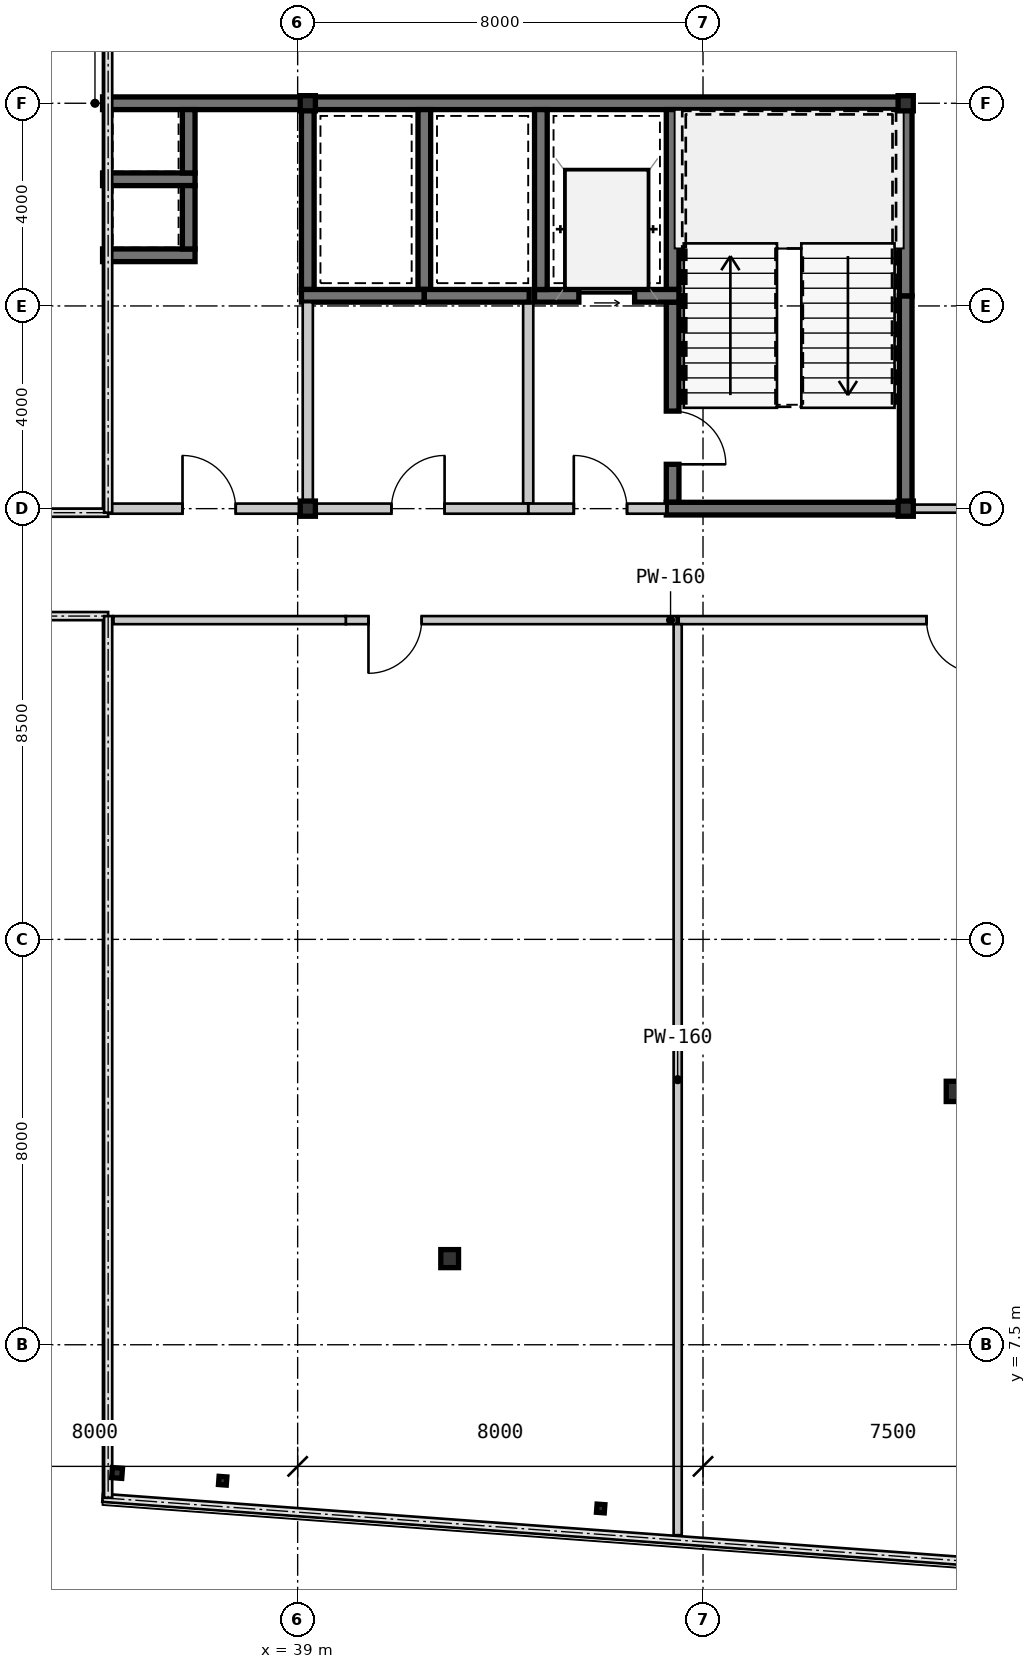
"""IFC4 building model, lengths in metres.
Left out: names, types, materials, properties, quantities, classifications, styles, units other than length and angle.
Written with IfcOpenShell. Run it as: python <this file> out.ifc"""

import sys

from ifc_helpers import new_model, si_unit, direction, frame, frame_2d, origin, origin_2d, place, context, subcontext, project, spatial, rectangle, hollow_rectangle, i_section, extrude, source, transform, mapped, element, fill, save


model = new_model("IFC4")
c1 = context("Model", 3, precision=1e-05, world=origin(), true_north=direction((0.0, 1.0)))
c2 = subcontext(c1, "Body", "Model", "MODEL_VIEW")
j1 = project(units=[si_unit("LENGTHUNIT", "METRE"), si_unit("PLANEANGLEUNIT", "RADIAN")], contexts=[c1])
p1 = place(None, origin())
s1 = spatial("IfcSite", under=j1, at=p1, CompositionType="ELEMENT")
p2 = place(p1, origin())
s2 = spatial("IfcBuilding", under=s1, at=p2, CompositionType="ELEMENT")
p3 = place(p2, frame((0.0, 0.0, 230.3)))
s3 = spatial("IfcBuildingStorey", under=s2, at=p3, CompositionType="ELEMENT", Elevation=230.3)
m1 = source(origin(), c2, "Body", "SweptSolid", [
    extrude(hollow_rectangle(XDim=0.3, YDim=0.3, WallThickness=0.012, at=origin_2d()), origin(), (0.0, 0.0, 1.0), 3.15),
])
for number, where, z_axis, x_axis in (
    (1, (39.2, 24.0, 0.0), (0.0, 0.0, 1.0), (1.0, 0.0, 0.0)),
    (2, (51.0, 24.0, 0.0), (0.0, 0.0, 1.0), (1.0, 0.0, 0.0)),
    (3, (39.2, 32.0, 0.0), (0.0, 0.0, 1.0), (1.0, 0.0, 0.0)),
    (4, (51.0, 32.0, 0.0), (0.0, 0.0, 1.0), (1.0, 0.0, 0.0)),
):
    element("IfcColumn", number, at=place(p3, frame(where, z_axis=z_axis, x_axis=x_axis)), inside=s3, PredefinedType="COLUMN", context=c2, shape_type="MappedRepresentation", body=[
        mapped(m1, transform((0.0, 0.0, 0.0), scale=1.0)),
    ])
m2 = source(origin(), c2, "Body", "SweptSolid", [
    extrude(i_section(OverallWidth=0.35, OverallDepth=0.356, WebThickness=0.018, FlangeThickness=0.028, at=origin_2d()), origin(), (0.0, 0.0, 1.0), 3.15),
])
p4 = place(p3, frame((42.0, 9.2, 0.0), z_axis=(0.0, 0.0, 1.0), x_axis=(1.0, 0.0, 0.0)))
e5 = element("IfcColumn", 5, at=p4, inside=s3, PredefinedType="COLUMN", context=c2, shape_type="MappedRepresentation", body=[
    mapped(m2, transform((0.0, 0.0, 0.0), scale=1.0)),
])
m3 = source(origin(), c2, "Body", "SweptSolid", [
    extrude(hollow_rectangle(XDim=0.4, YDim=0.4, WallThickness=0.016, at=origin_2d()), origin(), (0.0, 0.0, 1.0), 3.15),
])
p5 = place(p3, frame((52.0, 12.5, 0.0), z_axis=(0.0, 0.0, 1.0), x_axis=(1.0, 0.0, 0.0)))
e6 = element("IfcColumn", 6, at=p5, inside=s3, PredefinedType="COLUMN", context=c2, shape_type="MappedRepresentation", body=[
    mapped(m3, transform((0.0, 0.0, 0.0), scale=1.0)),
])
m4 = source(origin(), c2, "Body", "SweptSolid", [
    extrude(i_section(OverallWidth=0.154, OverallDepth=0.162, WebThickness=0.008, FlangeThickness=0.011, at=origin_2d()), origin(), (0.0, 0.0, 1.0), 3.15),
])
for number, where, z_axis, x_axis in (
    (7, (37.521, 4.817, 0.0), (0.0, 0.0, 1.0), (0.997, -0.073, 0.0)),
    (8, (44.98, 4.269, 0.0), (0.0, 0.0, 1.0), (0.997, -0.073, 0.0)),
):
    element("IfcColumn", number, at=place(p3, frame(where, z_axis=z_axis, x_axis=x_axis)), inside=s3, PredefinedType="COLUMN", context=c2, shape_type="MappedRepresentation", body=[
        mapped(m4, transform((0.0, 0.0, 0.0), scale=1.0)),
    ])
m5 = source(origin(), c2, "Body", "SweptSolid", [
    extrude(hollow_rectangle(XDim=0.2, YDim=0.2, WallThickness=0.009, at=origin_2d()), origin(), (0.0, 0.0, 1.0), 3.15),
])
p6 = place(p3, frame((35.436, 4.97, 0.0), z_axis=(0.0, 0.0, 1.0), x_axis=(0.997314477224, -0.073238197128, 0.0)))
e9 = element("IfcColumn", 9, at=p6, inside=s3, PredefinedType="COLUMN", context=c2, shape_type="MappedRepresentation", body=[
    mapped(m5, transform((0.0, 0.0, 0.0), scale=1.0)),
])
m6 = source(origin(), c2, "Body", "SweptSolid", [
    extrude(rectangle(XDim=4.05, YDim=0.25, at=frame_2d((2.025, 0.0))), origin(), (0.0, 0.0, 1.0), 2.93),
])
p7 = place(p3, frame((35.15, 32.0, 0.0), z_axis=(0.0, 0.0, 1.0), x_axis=(1.0, 0.0, 0.0)))
e10 = element("IfcWall", 10, at=p7, inside=s3, PredefinedType="SHEAR", context=c2, shape_type="MappedRepresentation", body=[
    mapped(m6, transform((0.0, 0.0, 0.0), scale=1.0)),
])
m7 = source(origin(), c2, "Body", "SweptSolid", [
    extrude(rectangle(XDim=11.925, YDim=0.25, at=frame_2d((5.962, 0.0))), origin(), (0.0, 0.0, 1.0), 2.93),
])
p8 = place(p3, frame((39.2, 32.0, 0.0), z_axis=(0.0, 0.0, 1.0), x_axis=(1.0, 0.0, 0.0)))
e11 = element("IfcWall", 11, at=p8, inside=s3, PredefinedType="SHEAR", context=c2, shape_type="MappedRepresentation", body=[
    mapped(m7, transform((0.0, 0.0, 0.0), scale=1.0)),
])
m8 = source(origin(), c2, "Body", "SweptSolid", [
    extrude(rectangle(XDim=4.075, YDim=0.25, at=frame_2d((2.038, 0.0))), origin(), (0.0, 0.0, 1.0), 2.93),
])
p9 = place(p3, frame((51.0, 24.125, 0.0), z_axis=(0.0, 0.0, 1.0), x_axis=(0.0, 1.0, 0.0)))
e12 = element("IfcWall", 12, at=p9, inside=s3, PredefinedType="SHEAR", context=c2, shape_type="MappedRepresentation", body=[
    mapped(m8, transform((0.0, 0.0, 0.0), scale=1.0)),
])
m9 = source(origin(), c2, "Body", "SweptSolid", [
    extrude(rectangle(XDim=3.675, YDim=0.25, at=frame_2d((1.837, 0.0))), origin(), (0.0, 0.0, 1.0), 2.93),
])
p10 = place(p3, frame((51.0, 28.2, 0.0), z_axis=(0.0, 0.0, 1.0), x_axis=(0.0, 1.0, 0.0)))
e13 = element("IfcWall", 13, at=p10, inside=s3, PredefinedType="SHEAR", context=c2, shape_type="MappedRepresentation", body=[
    mapped(m9, transform((0.0, 0.0, 0.0), scale=1.0)),
])
m10 = source(origin(), c2, "Body", "SweptSolid", [
    extrude(rectangle(XDim=3.55, YDim=0.25, at=frame_2d((1.775, 0.0))), origin(), (0.0, 0.0, 1.0), 2.93),
])
p11 = place(p3, frame((46.4, 31.875, 0.0), z_axis=(0.0, 0.0, 1.0), x_axis=(0.0, -1.0, 0.0)))
e14 = element("IfcWall", 14, at=p11, inside=s3, PredefinedType="SHEAR", context=c2, shape_type="MappedRepresentation", body=[
    mapped(m10, transform((0.0, 0.0, 0.0), scale=1.0)),
])
m11 = source(origin(), c2, "Body", "SweptSolid", [
    extrude(rectangle(XDim=3.95, YDim=0.25, at=frame_2d((1.975, 0.0))), origin(), (0.0, 0.0, 1.0), 2.93),
])
p12 = place(p3, frame((46.4, 28.075, 0.0), z_axis=(0.0, 0.0, 1.0), x_axis=(0.0, -1.0, 0.0)))
e15 = element("IfcWall", 15, at=p12, inside=s3, PredefinedType="SHEAR", context=c2, shape_type="MappedRepresentation", body=[
    mapped(m11, transform((0.0, 0.0, 0.0), scale=1.0)),
])
m12 = source(origin(), c2, "Body", "SweptSolid", [
    extrude(rectangle(XDim=1.05, YDim=2.1, at=frame_2d((0.525, 1.05))), frame((0.0, 0.135, 0.0), z_axis=(0.0, -1.0, 0.0), x_axis=(1.0, 0.0, 0.0)), (0.0, 0.0, 1.0), 0.27),
])
p13 = place(p12, frame((2.15, 0.0, 0.0)))
e16 = element("IfcOpeningElement", 16, at=p13, cuts=e15, PredefinedType="OPENING", context=c2, shape_type="MappedRepresentation", body=[
    mapped(m12, transform((0.0, 0.0, 0.0), scale=1.0)),
])
m13 = source(origin(), c2, "Body", "SweptSolid", [
    extrude(rectangle(XDim=4.85, YDim=0.25, at=frame_2d((2.425, 0.0))), origin(), (0.0, 0.0, 1.0), 2.93),
])
p14 = place(p3, frame((46.275, 24.0, 0.0), z_axis=(0.0, 0.0, 1.0), x_axis=(1.0, 0.0, 0.0)))
e17 = element("IfcWall", 17, at=p14, inside=s3, PredefinedType="SHEAR", context=c2, shape_type="MappedRepresentation", body=[
    mapped(m13, transform((0.0, 0.0, 0.0), scale=1.0)),
])
m14 = source(origin(), c2, "Body", "SweptSolid", [
    extrude(rectangle(XDim=2.85, YDim=0.25, at=frame_2d((1.425, 0.0))), origin(), (0.0, 0.0, 1.0), 2.93),
])
p15 = place(p3, frame((43.675, 28.2, 0.0), z_axis=(0.0, 0.0, 1.0), x_axis=(1.0, 0.0, 0.0)))
e18 = element("IfcWall", 18, at=p15, inside=s3, PredefinedType="SHEAR", context=c2, shape_type="MappedRepresentation", body=[
    mapped(m14, transform((0.0, 0.0, 0.0), scale=1.0)),
])
m15 = source(origin(), c2, "Body", "SweptSolid", [
    extrude(rectangle(XDim=1.1, YDim=2.15, at=frame_2d((0.55, 1.075))), frame((0.0, 0.135, 0.0), z_axis=(0.0, -1.0, 0.0), x_axis=(1.0, 0.0, 0.0)), (0.0, 0.0, 1.0), 0.27),
])
p16 = place(p15, frame((0.875, 0.0, 0.0)))
e19 = element("IfcOpeningElement", 19, at=p16, cuts=e18, PredefinedType="OPENING", context=c2, shape_type="MappedRepresentation", body=[
    mapped(m15, transform((0.0, 0.0, 0.0), scale=1.0)),
])
p17 = place(p3, frame((43.8, 31.875, 0.0), z_axis=(0.0, 0.0, 1.0), x_axis=(0.0, -1.0, 0.0)))
e20 = element("IfcWall", 20, at=p17, inside=s3, PredefinedType="SHEAR", context=c2, shape_type="MappedRepresentation", body=[
    mapped(m10, transform((0.0, 0.0, 0.0), scale=1.0)),
])
m16 = source(origin(), c2, "Body", "SweptSolid", [
    extrude(rectangle(XDim=3.975, YDim=0.2, at=frame_2d((1.987, 0.0))), origin(), (0.0, 0.0, 1.0), 2.93),
])
p18 = place(p3, frame((43.55, 28.075, 0.0), z_axis=(0.0, 0.0, 1.0), x_axis=(0.0, -1.0, 0.0)))
e21 = element("IfcWall", 21, at=p18, inside=s3, PredefinedType="SOLIDWALL", context=c2, shape_type="MappedRepresentation", body=[
    mapped(m16, transform((0.0, 0.0, 0.0), scale=1.0)),
])
m17 = source(origin(), c2, "Body", "SweptSolid", [
    extrude(rectangle(XDim=2.725, YDim=0.2, at=frame_2d((1.362, 0.0))), origin(), (0.0, 0.0, 1.0), 2.397),
])
p19 = place(p3, frame((43.55, 24.0, 0.0), z_axis=(0.0, 0.0, 1.0), x_axis=(1.0, 0.0, 0.0)))
e22 = element("IfcWall", 22, at=p19, inside=s3, PredefinedType="SOLIDWALL", context=c2, shape_type="MappedRepresentation", body=[
    mapped(m17, transform((0.0, 0.0, 0.0), scale=1.0)),
])
m18 = source(origin(), c2, "Body", "SweptSolid", [
    extrude(rectangle(XDim=1.05, YDim=2.1, at=frame_2d((0.525, 1.05))), frame((0.0, 0.11, 0.0), z_axis=(0.0, -1.0, 0.0), x_axis=(1.0, 0.0, 0.0)), (0.0, 0.0, 1.0), 0.22),
])
p20 = place(p19, frame((0.9, 0.0, 0.0)))
e23 = element("IfcOpeningElement", 23, at=p20, cuts=e22, PredefinedType="OPENING", context=c2, shape_type="MappedRepresentation", body=[
    mapped(m18, transform((0.0, 0.0, 0.0), scale=1.0)),
])
m19 = source(origin(), c2, "Body", "SweptSolid", [
    extrude(rectangle(XDim=1.825, YDim=0.25, at=frame_2d((0.913, 0.0))), origin(), (0.0, 0.0, 1.0), 2.93),
])
p21 = place(p3, frame((35.15, 30.5, 0.0), z_axis=(0.0, 0.0, 1.0), x_axis=(1.0, 0.0, 0.0)))
e24 = element("IfcWall", 24, at=p21, inside=s3, PredefinedType="SHEAR", context=c2, shape_type="MappedRepresentation", body=[
    mapped(m19, transform((0.0, 0.0, 0.0), scale=1.0)),
])
m20 = source(origin(), c2, "Body", "SweptSolid", [
    extrude(rectangle(XDim=1.25, YDim=0.25, at=frame_2d((0.625, 0.0))), origin(), (0.0, 0.0, 1.0), 2.93),
])
p22 = place(p3, frame((36.85, 30.625, 0.0), z_axis=(0.0, 0.0, 1.0), x_axis=(0.0, 1.0, 0.0)))
e25 = element("IfcWall", 25, at=p22, inside=s3, PredefinedType="SHEAR", context=c2, shape_type="MappedRepresentation", body=[
    mapped(m20, transform((0.0, 0.0, 0.0), scale=1.0)),
])
p23 = place(p3, frame((35.15, 29.0, 0.0), z_axis=(0.0, 0.0, 1.0), x_axis=(1.0, 0.0, 0.0)))
e26 = element("IfcWall", 26, at=p23, inside=s3, PredefinedType="SHEAR", context=c2, shape_type="MappedRepresentation", body=[
    mapped(m19, transform((0.0, 0.0, 0.0), scale=1.0)),
])
p24 = place(p3, frame((36.85, 29.125, 0.0), z_axis=(0.0, 0.0, 1.0), x_axis=(0.0, 1.0, 0.0)))
e27 = element("IfcWall", 27, at=p24, inside=s3, PredefinedType="SHEAR", context=c2, shape_type="MappedRepresentation", body=[
    mapped(m20, transform((0.0, 0.0, 0.0), scale=1.0)),
])
for number, where, z_axis, x_axis in (
    (28, (41.5, 28.325, 0.0), (0.0, 0.0, 1.0), (0.0, 1.0, 0.0)),
    (29, (39.2, 31.875, 0.0), (0.0, 0.0, 1.0), (0.0, -1.0, 0.0)),
):
    element("IfcWall", number, at=place(p3, frame(where, z_axis=z_axis, x_axis=x_axis)), inside=s3, PredefinedType="SHEAR", context=c2, shape_type="MappedRepresentation", body=[
        mapped(m10, transform((0.0, 0.0, 0.0), scale=1.0)),
    ])
m21 = source(origin(), c2, "Body", "SweptSolid", [
    extrude(rectangle(XDim=2.425, YDim=0.25, at=frame_2d((1.212, 0.0))), origin(), (0.0, 0.0, 1.0), 2.93),
])
p25 = place(p3, frame((39.075, 28.2, 0.0), z_axis=(0.0, 0.0, 1.0), x_axis=(1.0, 0.0, 0.0)))
e30 = element("IfcWall", 30, at=p25, inside=s3, PredefinedType="SHEAR", context=c2, shape_type="MappedRepresentation", body=[
    mapped(m21, transform((0.0, 0.0, 0.0), scale=1.0)),
])
m22 = source(origin(), c2, "Body", "SweptSolid", [
    extrude(rectangle(XDim=2.07, YDim=0.25, at=frame_2d((1.035, 0.0))), origin(), (0.0, 0.0, 1.0), 2.93),
])
p26 = place(p3, frame((41.5, 28.2, 0.0), z_axis=(0.0, 0.0, 1.0), x_axis=(1.0, 0.0, 0.0)))
e31 = element("IfcWall", 31, at=p26, inside=s3, PredefinedType="SHEAR", context=c2, shape_type="MappedRepresentation", body=[
    mapped(m22, transform((0.0, 0.0, 0.0), scale=1.0)),
])
m23 = source(origin(), c2, "Body", "SweptSolid", [
    extrude(rectangle(XDim=3.975, YDim=0.2, at=frame_2d((1.987, 0.0))), origin(), (0.0, 0.0, 1.0), 2.47),
])
p27 = place(p3, frame((39.2, 28.075, 0.0), z_axis=(0.0, 0.0, 1.0), x_axis=(0.0, -1.0, 0.0)))
e32 = element("IfcWall", 32, at=p27, inside=s3, PredefinedType="SOLIDWALL", context=c2, shape_type="MappedRepresentation", body=[
    mapped(m23, transform((0.0, 0.0, 0.0), scale=1.0)),
])
m24 = source(origin(), c2, "Body", "SweptSolid", [
    extrude(rectangle(XDim=3.895, YDim=0.2, at=frame_2d((1.947, 0.0))), origin(), (0.0, 0.0, 1.0), 2.23),
])
p28 = place(p3, frame((39.2, 24.0, 0.0), z_axis=(0.0, 0.0, 1.0), x_axis=(-1.0, 0.0, 0.0)))
e33 = element("IfcWall", 33, at=p28, inside=s3, PredefinedType="SOLIDWALL", context=c2, shape_type="MappedRepresentation", body=[
    mapped(m24, transform((0.0, 0.0, 0.0), scale=1.0)),
])
p29 = place(p28, frame((1.422, 0.0, 0.0)))
e34 = element("IfcOpeningElement", 34, at=p29, cuts=e33, PredefinedType="OPENING", context=c2, shape_type="MappedRepresentation", body=[
    mapped(m18, transform((0.0, 0.0, 0.0), scale=1.0)),
])
m25 = source(origin(), c2, "Body", "SweptSolid", [
    extrude(rectangle(XDim=4.35, YDim=0.2, at=frame_2d((2.175, 0.0))), origin(), (0.0, 0.0, 1.0), 2.397),
])
p30 = place(p3, frame((43.55, 24.0, 0.0), z_axis=(0.0, 0.0, 1.0), x_axis=(-1.0, 0.0, 0.0)))
e35 = element("IfcWall", 35, at=p30, inside=s3, PredefinedType="SOLIDWALL", context=c2, shape_type="MappedRepresentation", body=[
    mapped(m25, transform((0.0, 0.0, 0.0), scale=1.0)),
])
p31 = place(p30, frame((1.65, 0.0, 0.0)))
e36 = element("IfcOpeningElement", 36, at=p31, cuts=e35, PredefinedType="OPENING", context=c2, shape_type="MappedRepresentation", body=[
    mapped(m18, transform((0.0, 0.0, 0.0), scale=1.0)),
])
m26 = source(origin(), c2, "Body", "SweptSolid", [
    extrude(rectangle(XDim=6.378, YDim=0.16, at=frame_2d((3.189, 0.0))), origin(), (0.0, 0.0, 1.0), 2.93),
])
p32 = place(p3, frame((51.125, 24.0, 0.0), z_axis=(0.0, 0.0, 1.0), x_axis=(1.0, 0.0, 0.0)))
e37 = element("IfcWall", 37, at=p32, inside=s3, PredefinedType="PARTITIONING", context=c2, shape_type="MappedRepresentation", body=[
    mapped(m26, transform((0.0, 0.0, 0.0), scale=1.0)),
])
m27 = source(origin(), c2, "Body", "SweptSolid", [
    extrude(rectangle(XDim=1.05, YDim=2.1, at=frame_2d((0.525, 1.05))), frame((0.0, 0.09, 0.0), z_axis=(0.0, -1.0, 0.0), x_axis=(1.0, 0.0, 0.0)), (0.0, 0.0, 1.0), 0.18),
])
p33 = place(p32, frame((2.612, 0.0, 0.0)))
e38 = element("IfcOpeningElement", 38, at=p33, cuts=e37, PredefinedType="OPENING", context=c2, shape_type="MappedRepresentation", body=[
    mapped(m27, transform((0.0, 0.0, 0.0), scale=1.0)),
])
m28 = source(origin(), c2, "Body", "SweptSolid", [
    extrude(rectangle(XDim=6.53, YDim=0.16, at=frame_2d((3.265, 0.0))), origin(), (0.0, 0.0, 1.0), 2.93),
])
p34 = place(p3, frame((46.48, 21.8, 0.0), z_axis=(0.0, 0.0, 1.0), x_axis=(-1.0, 0.0, 0.0)))
e39 = element("IfcWall", 39, at=p34, inside=s3, PredefinedType="PARTITIONING", context=c2, shape_type="MappedRepresentation", body=[
    mapped(m28, transform((0.0, 0.0, 0.0), scale=1.0)),
])
p35 = place(p34, frame((5.032, 0.0, 0.0)))
e40 = element("IfcOpeningElement", 40, at=p35, cuts=e39, PredefinedType="OPENING", context=c2, shape_type="MappedRepresentation", body=[
    mapped(m27, transform((0.0, 0.0, 0.0), scale=1.0)),
])
m29 = source(origin(), c2, "Body", "SweptSolid", [
    extrude(rectangle(XDim=4.584, YDim=0.16, at=frame_2d((2.292, 0.0))), origin(), (0.0, 0.0, 1.0), 2.23),
])
p36 = place(p3, frame((39.95, 21.8, 0.0), z_axis=(0.0, 0.0, 1.0), x_axis=(-1.0, 0.0, 0.0)))
e41 = element("IfcWall", 41, at=p36, inside=s3, PredefinedType="PARTITIONING", context=c2, shape_type="MappedRepresentation", body=[
    mapped(m29, transform((0.0, 0.0, 0.0), scale=1.0)),
])
m30 = source(origin(), c2, "Body", "SweptSolid", [
    extrude(rectangle(XDim=10.833, YDim=0.16, at=frame_2d((5.417, 0.0))), origin(), (0.0, 0.0, 1.0), 2.93),
])
p37 = place(p3, frame((57.353, 21.8, 0.0), z_axis=(0.0, 0.0, 1.0), x_axis=(-1.0, 0.0, 0.0)))
e42 = element("IfcWall", 42, at=p37, inside=s3, PredefinedType="PARTITIONING", context=c2, shape_type="MappedRepresentation", body=[
    mapped(m30, transform((0.0, 0.0, 0.0), scale=1.0)),
])
p38 = place(p37, frame((4.892, 0.0, 0.0)))
e43 = element("IfcOpeningElement", 43, at=p38, cuts=e42, PredefinedType="OPENING", context=c2, shape_type="MappedRepresentation", body=[
    mapped(m27, transform((0.0, 0.0, 0.0), scale=1.0)),
])
m31 = source(origin(), c2, "Body", "SweptSolid", [
    extrude(rectangle(XDim=17.978, YDim=0.16, at=frame_2d((8.989, 0.0))), origin(), (0.0, 0.0, 1.0), 2.93),
])
p39 = place(p3, frame((46.5, 21.72, 0.0), z_axis=(0.0, 0.0, 1.0), x_axis=(0.0, -1.0, 0.0)))
e44 = element("IfcWall", 44, at=p39, inside=s3, PredefinedType="PARTITIONING", context=c2, shape_type="MappedRepresentation", body=[
    mapped(m31, transform((0.0, 0.0, 0.0), scale=1.0)),
])
m32 = source(origin(), c2, "Body", "SweptSolid", [
    extrude(rectangle(XDim=1.05, YDim=2.1, at=frame_2d((0.525, 1.05))), frame((0.0, 0.025, 0.0), z_axis=(0.0, -1.0, 0.0), x_axis=(1.0, 0.0, 0.0)), (0.0, 0.0, 1.0), 0.05),
])
p40 = place(p13, origin())
e45 = element("IfcDoor", 45, at=p40, inside=s3, OperationType="SINGLE_SWING_RIGHT", PredefinedType="DOOR", context=c2, shape_type="MappedRepresentation", body=[
    mapped(m32, transform((0.0, 0.0, 0.0), scale=1.0)),
])
fill(e16, e45)
m33 = source(origin(), c2, "Body", "SweptSolid", [
    extrude(rectangle(XDim=1.1, YDim=2.15, at=frame_2d((0.55, 1.075))), frame((0.0, 0.025, 0.0), z_axis=(0.0, -1.0, 0.0), x_axis=(1.0, 0.0, 0.0)), (0.0, 0.0, 1.0), 0.05),
])
p41 = place(p16, origin())
e46 = element("IfcDoor", 46, at=p41, inside=s3, OperationType="SLIDING_TO_LEFT", PredefinedType="DOOR", context=c2, shape_type="MappedRepresentation", body=[
    mapped(m33, transform((0.0, 0.0, 0.0), scale=1.0)),
])
fill(e19, e46)
p42 = place(p20, origin())
e47 = element("IfcDoor", 47, at=p42, inside=s3, OperationType="SINGLE_SWING_LEFT", PredefinedType="DOOR", context=c2, shape_type="MappedRepresentation", body=[
    mapped(m32, transform((0.0, 0.0, 0.0), scale=1.0)),
])
fill(e23, e47)
p43 = place(p29, frame((1.05, 0.0, 0.0), z_axis=(0.0, 0.0, 1.0), x_axis=(-1.0, 0.0, 0.0)))
e48 = element("IfcDoor", 48, at=p43, inside=s3, OperationType="SINGLE_SWING_LEFT", PredefinedType="DOOR", context=c2, shape_type="MappedRepresentation", body=[
    mapped(m32, transform((0.0, 0.0, 0.0), scale=1.0)),
])
fill(e34, e48)
p44 = place(p31, frame((1.05, 0.0, 0.0), z_axis=(0.0, 0.0, 1.0), x_axis=(-1.0, 0.0, 0.0)))
e49 = element("IfcDoor", 49, at=p44, inside=s3, OperationType="SINGLE_SWING_RIGHT", PredefinedType="DOOR", context=c2, shape_type="MappedRepresentation", body=[
    mapped(m32, transform((0.0, 0.0, 0.0), scale=1.0)),
])
fill(e36, e49)
p45 = place(p35, origin())
e50 = element("IfcDoor", 50, at=p45, inside=s3, OperationType="SINGLE_SWING_RIGHT", PredefinedType="DOOR", context=c2, shape_type="MappedRepresentation", body=[
    mapped(m32, transform((0.0, 0.0, 0.0), scale=1.0)),
])
fill(e40, e50)
p46 = place(p38, origin())
e51 = element("IfcDoor", 51, at=p46, inside=s3, OperationType="SINGLE_SWING_LEFT", PredefinedType="DOOR", context=c2, shape_type="MappedRepresentation", body=[
    mapped(m32, transform((0.0, 0.0, 0.0), scale=1.0)),
])
fill(e43, e51)
save(model, sys.argv[1])
